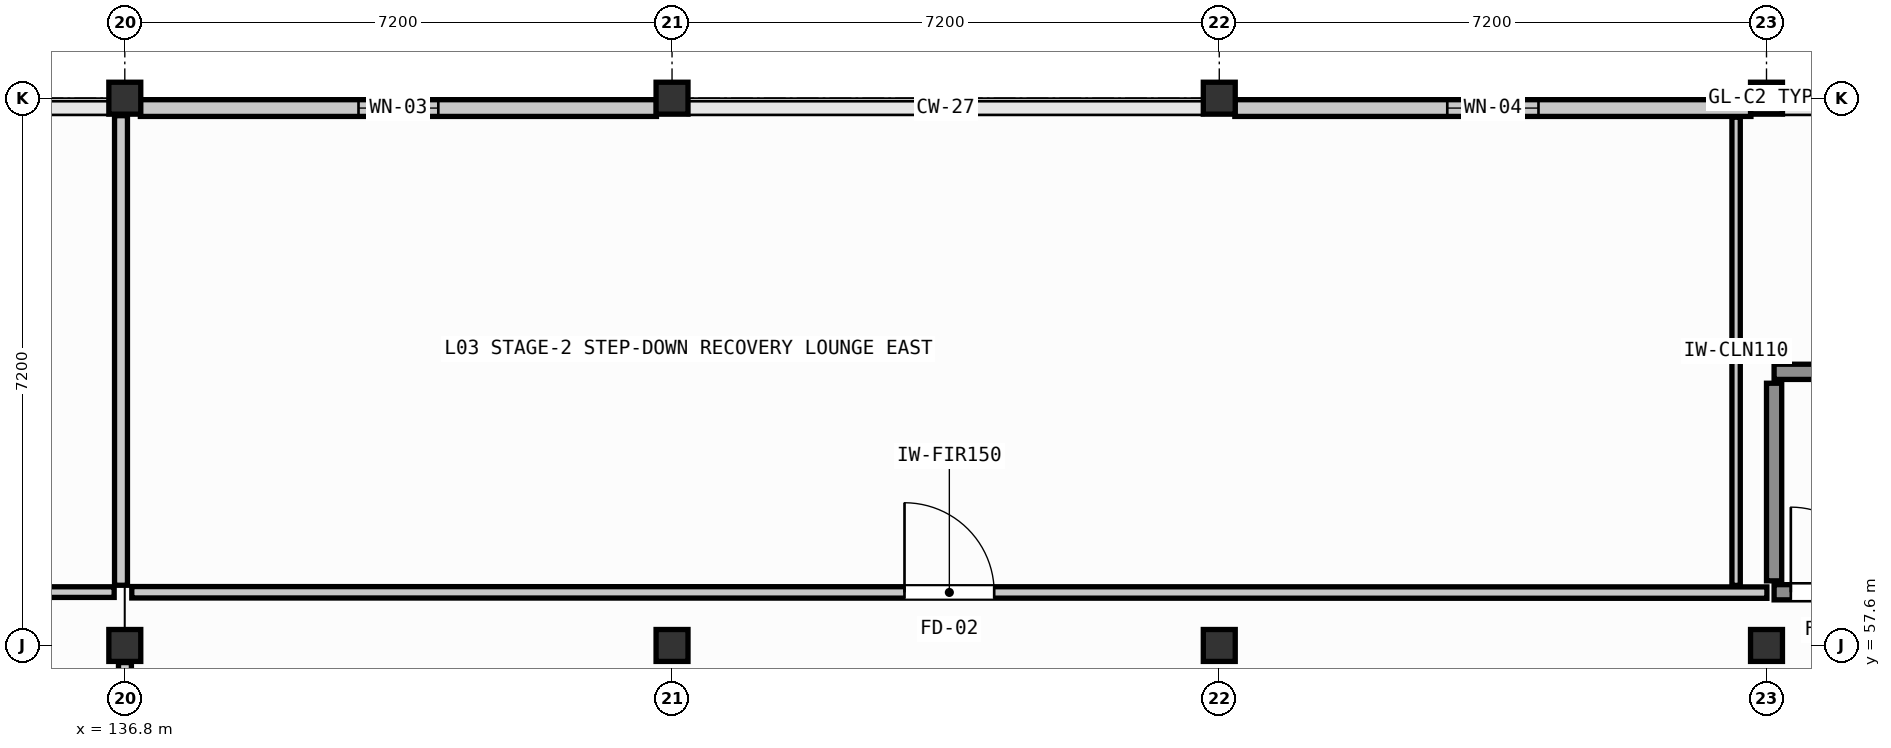
"""IFC4 building model, lengths in metres.
Left out: names, types, materials, properties, quantities, classifications, styles, units other than length and angle.
Written with IfcOpenShell. Run it as: python <this file> out.ifc"""

import sys

from ifc_helpers import new_model, si_unit, direction, frame, frame_2d, origin, origin_2d, place, context, subcontext, project, spatial, rectangle, extrude, element, fill, save


model = new_model("IFC4")
c1 = context("Model", 3, precision=1e-05, world=origin(), true_north=direction((0.0, 1.0)))
c2 = subcontext(c1, "Body", "Model", "MODEL_VIEW")
j1 = project(units=[si_unit("LENGTHUNIT", "METRE"), si_unit("PLANEANGLEUNIT", "RADIAN")], contexts=[c1])
p1 = place(None, origin())
s1 = spatial("IfcSite", under=j1, at=p1, CompositionType="ELEMENT")
p2 = place(p1, origin())
s2 = spatial("IfcBuilding", under=s1, at=p2, CompositionType="ELEMENT")
p3 = place(p2, frame((0.0, 0.0, 9.3)))
s3 = spatial("IfcBuildingStorey", under=s2, at=p3, CompositionType="ELEMENT", Elevation=9.3)
for number, where, z_axis, x_axis in (
    (1, (136.8, 57.6, 0.0), (0.0, 0.0, 1.0), (1.0, 0.0, 0.0)),
    (2, (136.8, 64.8, 0.0), (0.0, 0.0, 1.0), (1.0, 0.0, 0.0)),
    (3, (144.0, 57.6, 0.0), (0.0, 0.0, 1.0), (1.0, 0.0, 0.0)),
    (4, (144.0, 64.8, 0.0), (0.0, 0.0, 1.0), (1.0, 0.0, 0.0)),
    (5, (151.2, 57.6, 0.0), (0.0, 0.0, 1.0), (1.0, 0.0, 0.0)),
    (6, (151.2, 64.8, 0.0), (0.0, 0.0, 1.0), (1.0, 0.0, 0.0)),
    (7, (158.4, 57.6, 0.0), (0.0, 0.0, 1.0), (1.0, 0.0, 0.0)),
    (8, (158.4, 64.8, 0.0), (0.0, 0.0, 1.0), (1.0, 0.0, 0.0)),
):
    element("IfcColumn", number, at=place(p3, frame(where, z_axis=z_axis, x_axis=x_axis)), inside=s3, PredefinedType="COLUMN", context=c2, shape_type="SweptSolid", body=[
        extrude(rectangle(XDim=0.42, YDim=0.42, at=origin_2d()), origin(), (0.0, 0.0, 1.0), 3.99),
    ])
p4 = place(p3, frame((137.005, 64.67, 0.0), z_axis=(0.0, 0.0, 1.0), x_axis=(1.0, 0.0, 0.0)))
e9 = element("IfcWall", 9, at=p4, inside=s3, PredefinedType="SOLIDWALL", context=c2, shape_type="SweptSolid", body=[
    extrude(rectangle(XDim=6.79, YDim=0.22, at=frame_2d((3.395, 0.0))), origin(), (0.0, 0.0, 1.0), 3.27),
])
p5 = place(p4, frame((2.87, 0.0, 2.1)))
e10 = element("IfcOpeningElement", 10, at=p5, cuts=e9, PredefinedType="OPENING", context=c2, shape_type="SweptSolid", body=[
    extrude(rectangle(XDim=1.05, YDim=0.65, at=frame_2d((0.525, 0.325))), frame((0.0, 0.12, 0.0), z_axis=(0.0, -1.0, 0.0), x_axis=(1.0, 0.0, 0.0)), (0.0, 0.0, 1.0), 0.24),
])
p6 = place(p3, frame((151.405, 64.67, 0.0), z_axis=(0.0, 0.0, 1.0), x_axis=(1.0, 0.0, 0.0)))
e11 = element("IfcWall", 11, at=p6, inside=s3, PredefinedType="SOLIDWALL", context=c2, shape_type="SweptSolid", body=[
    extrude(rectangle(XDim=6.79, YDim=0.22, at=frame_2d((3.395, 0.0))), origin(), (0.0, 0.0, 1.0), 3.27),
])
p7 = place(p6, frame((2.795, 0.0, 2.1)))
e12 = element("IfcOpeningElement", 12, at=p7, cuts=e11, PredefinedType="OPENING", context=c2, shape_type="SweptSolid", body=[
    extrude(rectangle(XDim=1.2, YDim=0.65, at=frame_2d((0.6, 0.325))), frame((0.0, 0.12, 0.0), z_axis=(0.0, -1.0, 0.0), x_axis=(1.0, 0.0, 0.0)), (0.0, 0.0, 1.0), 0.24),
])
p8 = place(p3, frame((158.5, 58.3, 0.0), z_axis=(0.0, 0.0, 1.0), x_axis=(1.0, 0.0, 0.0)))
e13 = element("IfcWall", 13, at=p8, inside=s3, PredefinedType="SHEAR", context=c2, shape_type="SweptSolid", body=[
    extrude(rectangle(XDim=6.775, YDim=0.2, at=frame_2d((3.387, 0.0))), origin(), (0.0, 0.0, 1.0), 3.975),
])
p9 = place(p8, frame((0.22, 0.0, 0.0)))
e14 = element("IfcOpeningElement", 14, at=p9, cuts=e13, PredefinedType="OPENING", context=c2, shape_type="SweptSolid", body=[
    extrude(rectangle(XDim=1.12, YDim=2.14, at=frame_2d((0.56, 1.07))), frame((0.0, 0.11, 0.0), z_axis=(0.0, -1.0, 0.0), x_axis=(1.0, 0.0, 0.0)), (0.0, 0.0, 1.0), 0.22),
])
p10 = place(p3, frame((158.5, 61.2, 0.0), z_axis=(0.0, 0.0, 1.0), x_axis=(1.0, 0.0, 0.0)))
e15 = element("IfcWall", 15, at=p10, inside=s3, PredefinedType="SHEAR", context=c2, shape_type="SweptSolid", body=[
    extrude(rectangle(XDim=6.775, YDim=0.2, at=frame_2d((3.387, 0.0))), origin(), (0.0, 0.0, 1.0), 3.975),
])
p11 = place(p3, frame((158.5, 58.45, 0.0), z_axis=(0.0, 0.0, 1.0), x_axis=(0.0, 1.0, 0.0)))
e16 = element("IfcWall", 16, at=p11, inside=s3, PredefinedType="SHEAR", context=c2, shape_type="SweptSolid", body=[
    extrude(rectangle(XDim=2.6, YDim=0.2, at=frame_2d((1.3, 0.0))), origin(), (0.0, 0.0, 1.0), 3.975),
])
p12 = place(p3, frame((136.802, 54.49, 0.0), z_axis=(0.0, 0.0, 1.0), x_axis=(0.0, 1.0, 0.0)))
e17 = element("IfcWall", 17, at=p12, inside=s3, PredefinedType="PARTITIONING", context=c2, shape_type="SweptSolid", body=[
    extrude(rectangle(XDim=2.885, YDim=0.17, at=frame_2d((1.442, 0.0))), origin(), (0.0, 0.0, 1.0), 3.27),
])
p13 = place(p12, frame((0.353, 0.0, 0.0)))
e18 = element("IfcOpeningElement", 18, at=p13, cuts=e17, PredefinedType="OPENING", context=c2, shape_type="SweptSolid", body=[
    extrude(rectangle(XDim=1.28, YDim=2.18, at=frame_2d((0.64, 1.09))), frame((0.0, 0.095, 0.0), z_axis=(0.0, -1.0, 0.0), x_axis=(1.0, 0.0, 0.0)), (0.0, 0.0, 1.0), 0.19),
])
p14 = place(p3, frame((136.892, 58.3, 0.0), z_axis=(0.0, 0.0, 1.0), x_axis=(0.999999976754, -0.000215619959, 0.0)))
e19 = element("IfcWall", 19, at=p14, inside=s3, PredefinedType="PARTITIONING", context=c2, shape_type="SweptSolid", body=[
    extrude(rectangle(XDim=21.513, YDim=0.15, at=frame_2d((10.757, 0.0))), origin(), (0.0, 0.0, 1.0), 3.35),
])
p15 = place(p14, frame((10.167, 0.0, 0.0)))
e20 = element("IfcOpeningElement", 20, at=p15, cuts=e19, PredefinedType="OPENING", context=c2, shape_type="SweptSolid", body=[
    extrude(rectangle(XDim=1.18, YDim=2.16, at=frame_2d((0.59, 1.08))), frame((0.0, 0.085, 0.0), z_axis=(0.0, -1.0, 0.0), x_axis=(1.0, 0.0, 0.0)), (0.0, 0.0, 1.0), 0.17),
])
p16 = place(p3, frame((136.75, 64.57, 0.0), z_axis=(0.0, 0.0, 1.0), x_axis=(0.0, -1.0, 0.0)))
e21 = element("IfcWall", 21, at=p16, inside=s3, PredefinedType="PARTITIONING", context=c2, shape_type="SweptSolid", body=[
    extrude(rectangle(XDim=6.178, YDim=0.17, at=frame_2d((3.089, 0.0))), origin(), (0.0, 0.0, 1.0), 3.27),
])
p17 = place(p3, frame((136.66, 58.302, 0.0), z_axis=(0.0, 0.0, 1.0), x_axis=(-1.0, 0.0, 0.0)))
e22 = element("IfcWall", 22, at=p17, inside=s3, PredefinedType="PARTITIONING", context=c2, shape_type="SweptSolid", body=[
    extrude(rectangle(XDim=27.97, YDim=0.14, at=frame_2d((13.985, 0.0))), origin(), (0.0, 0.0, 1.0), 3.35),
])
p18 = place(p17, frame((11.545, 0.0, 0.0)))
e23 = element("IfcOpeningElement", 23, at=p18, cuts=e22, PredefinedType="OPENING", context=c2, shape_type="SweptSolid", body=[
    extrude(rectangle(XDim=1.28, YDim=2.18, at=frame_2d((0.64, 1.09))), frame((0.0, 0.08, 0.0), z_axis=(0.0, -1.0, 0.0), x_axis=(1.0, 0.0, 0.0)), (0.0, 0.0, 1.0), 0.16),
])
p19 = place(p3, frame((158.0, 64.55, 0.0), z_axis=(0.0, 0.0, 1.0), x_axis=(0.0, -1.0, 0.0)))
e24 = element("IfcWall", 24, at=p19, inside=s3, PredefinedType="PARTITIONING", context=c2, shape_type="SweptSolid", body=[
    extrude(rectangle(XDim=6.16, YDim=0.11, at=frame_2d((3.08, 0.0))), origin(), (0.0, 0.0, 1.0), 3.27),
])
p20 = place(p5, origin())
e25 = element("IfcWindow", 25, at=p20, inside=s3, PartitioningType="SINGLE_PANEL", PredefinedType="WINDOW", context=c2, shape_type="SweptSolid", body=[
    extrude(rectangle(XDim=1.05, YDim=0.65, at=frame_2d((0.525, 0.325))), frame((0.0, 0.03, 0.0), z_axis=(0.0, -1.0, 0.0), x_axis=(1.0, 0.0, 0.0)), (0.0, 0.0, 1.0), 0.06),
])
fill(e10, e25)
p21 = place(p7, origin())
e26 = element("IfcWindow", 26, at=p21, inside=s3, PartitioningType="SINGLE_PANEL", PredefinedType="WINDOW", context=c2, shape_type="SweptSolid", body=[
    extrude(rectangle(XDim=1.2, YDim=0.65, at=frame_2d((0.6, 0.325))), frame((0.0, 0.03, 0.0), z_axis=(0.0, -1.0, 0.0), x_axis=(1.0, 0.0, 0.0)), (0.0, 0.0, 1.0), 0.06),
])
fill(e12, e26)
p22 = place(p9, origin())
e27 = element("IfcDoor", 27, at=p22, inside=s3, OperationType="SINGLE_SWING_LEFT", PredefinedType="DOOR", context=c2, shape_type="SweptSolid", body=[
    extrude(rectangle(XDim=1.12, YDim=2.14, at=frame_2d((0.56, 1.07))), frame((0.0, 0.025, 0.0), z_axis=(0.0, -1.0, 0.0), x_axis=(1.0, 0.0, 0.0)), (0.0, 0.0, 1.0), 0.05),
])
fill(e14, e27)
p23 = place(p15, origin())
e28 = element("IfcDoor", 28, at=p23, inside=s3, OperationType="SINGLE_SWING_LEFT", PredefinedType="DOOR", context=c2, shape_type="SweptSolid", body=[
    extrude(rectangle(XDim=1.18, YDim=2.16, at=frame_2d((0.59, 1.08))), frame((0.0, 0.025, 0.0), z_axis=(0.0, -1.0, 0.0), x_axis=(1.0, 0.0, 0.0)), (0.0, 0.0, 1.0), 0.05),
])
fill(e20, e28)
save(model, sys.argv[1])
